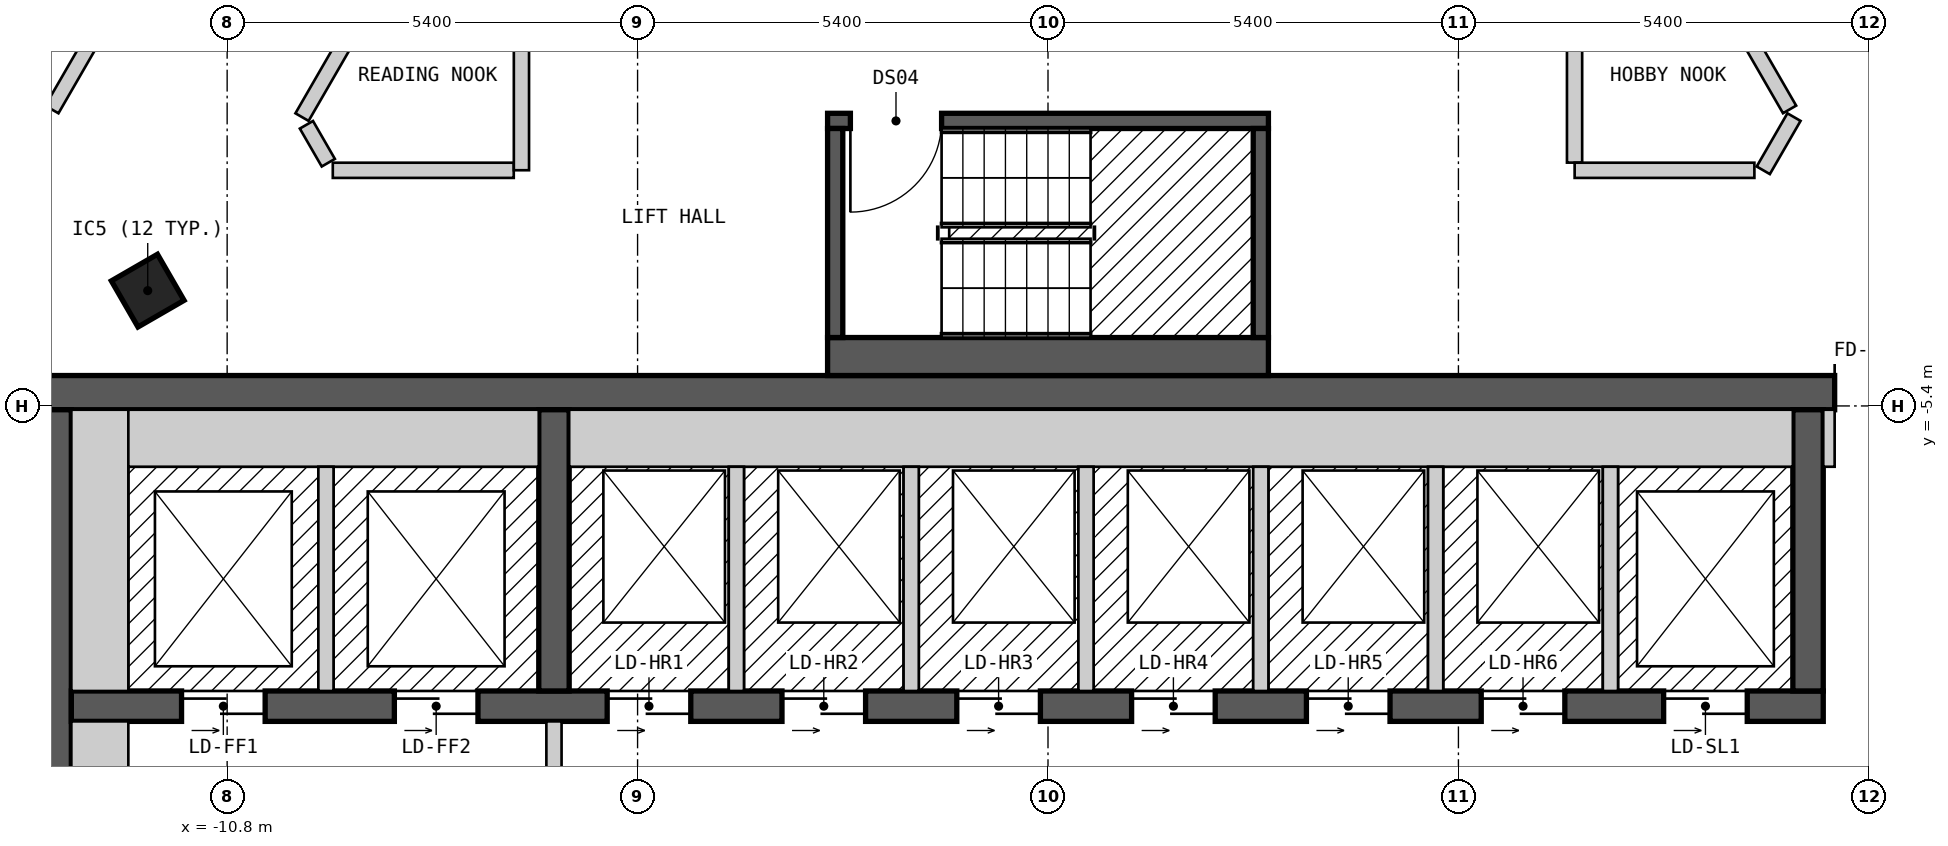
"""IFC4 building model, lengths in metres.
Left out: names, types, materials, properties, quantities, classifications, styles, units other than length and angle.
Written with IfcOpenShell. Run it as: python <this file> out.ifc"""

import sys

from ifc_helpers import new_model, si_unit, direction, frame, frame_2d, origin, origin_2d, place, context, subcontext, project, spatial, rectangle, extrude, element, fill, save


model = new_model("IFC4")
c1 = context("Model", 3, precision=1e-05, world=origin(), true_north=direction((0.0, 1.0)))
c2 = subcontext(c1, "Body", "Model", "MODEL_VIEW")
j1 = project(units=[si_unit("LENGTHUNIT", "METRE"), si_unit("PLANEANGLEUNIT", "RADIAN")], contexts=[c1])
p1 = place(None, origin())
s1 = spatial("IfcSite", under=j1, at=p1, CompositionType="ELEMENT")
p2 = place(p1, origin())
s2 = spatial("IfcBuilding", under=s1, at=p2, CompositionType="ELEMENT")
p3 = place(p2, frame((0.0, 0.0, 223.8)))
s3 = spatial("IfcBuildingStorey", under=s2, at=p3, CompositionType="ELEMENT", Elevation=223.8)
p4 = place(p3, frame((-11.845, -3.883, 0.0), z_axis=(0.0, 0.0, 1.0), x_axis=(0.499984884929, -0.866034130299, 0.0)))
e1 = element("IfcColumn", 1, at=p4, inside=s3, PredefinedType="COLUMN", context=c2, shape_type="SweptSolid", body=[
    extrude(rectangle(XDim=0.7, YDim=0.7, at=origin_2d()), origin(), (0.0, 0.0, 1.0), 3.0),
])
p5 = place(p3, frame((-13.3, -5.225, 0.0), z_axis=(0.0, 0.0, 1.0), x_axis=(1.0, 0.0, 0.0)))
e2 = element("IfcWall", 2, at=p5, inside=s3, PredefinedType="SHEAR", context=c2, shape_type="SweptSolid", body=[
    extrude(rectangle(XDim=26.6, YDim=0.45, at=frame_2d((13.3, 0.0))), origin(), (0.0, 0.0, 1.0), 2.7),
])
p6 = place(p5, frame((23.65, 0.0, 0.0)))
e3 = element("IfcOpeningElement", 3, at=p6, cuts=e2, PredefinedType="OPENING", context=c2, shape_type="SweptSolid", body=[
    extrude(rectangle(XDim=1.2, YDim=2.1, at=frame_2d((0.6, 1.05))), frame((0.0, 0.235, 0.0), z_axis=(0.0, -1.0, 0.0), x_axis=(1.0, 0.0, 0.0)), (0.0, 0.0, 1.0), 0.47),
])
p7 = place(p3, frame((-13.075, -18.55, 0.0), z_axis=(0.0, 0.0, 1.0), x_axis=(0.0, 1.0, 0.0)))
e4 = element("IfcWall", 4, at=p7, inside=s3, PredefinedType="SHEAR", context=c2, shape_type="SweptSolid", body=[
    extrude(rectangle(XDim=13.1, YDim=0.45, at=frame_2d((6.55, 0.0))), origin(), (0.0, 0.0, 1.0), 2.7),
])
p8 = place(p7, frame((4.35, 0.0, 0.0)))
e5 = element("IfcOpeningElement", 5, at=p8, cuts=e4, PredefinedType="OPENING", context=c2, shape_type="SweptSolid", body=[
    extrude(rectangle(XDim=1.2, YDim=2.1, at=frame_2d((0.6, 1.05))), frame((0.0, 0.235, 0.0), z_axis=(0.0, -1.0, 0.0), x_axis=(1.0, 0.0, 0.0)), (0.0, 0.0, 1.0), 0.47),
])
p9 = place(p3, frame((-12.85, -9.35, 0.0), z_axis=(0.0, 0.0, 1.0), x_axis=(1.0, 0.0, 0.0)))
e6 = element("IfcWall", 6, at=p9, inside=s3, PredefinedType="SHEAR", context=c2, shape_type="SweptSolid", body=[
    extrude(rectangle(XDim=23.05, YDim=0.4, at=frame_2d((11.525, 0.0))), origin(), (0.0, 0.0, 1.0), 2.7),
])
p10 = place(p9, frame((1.45, 0.0, 0.0)))
e7 = element("IfcOpeningElement", 7, at=p10, cuts=e6, PredefinedType="OPENING", context=c2, shape_type="SweptSolid", body=[
    extrude(rectangle(XDim=1.1, YDim=2.1, at=frame_2d((0.55, 1.05))), frame((0.0, 0.21, 0.0), z_axis=(0.0, -1.0, 0.0), x_axis=(1.0, 0.0, 0.0)), (0.0, 0.0, 1.0), 0.42),
])
p11 = place(p9, frame((4.25, 0.0, 0.0)))
e8 = element("IfcOpeningElement", 8, at=p11, cuts=e6, PredefinedType="OPENING", context=c2, shape_type="SweptSolid", body=[
    extrude(rectangle(XDim=1.1, YDim=2.1, at=frame_2d((0.55, 1.05))), frame((0.0, 0.21, 0.0), z_axis=(0.0, -1.0, 0.0), x_axis=(1.0, 0.0, 0.0)), (0.0, 0.0, 1.0), 0.42),
])
p12 = place(p9, frame((7.05, 0.0, 0.0)))
e9 = element("IfcOpeningElement", 9, at=p12, cuts=e6, PredefinedType="OPENING", context=c2, shape_type="SweptSolid", body=[
    extrude(rectangle(XDim=1.1, YDim=2.1, at=frame_2d((0.55, 1.05))), frame((0.0, 0.21, 0.0), z_axis=(0.0, -1.0, 0.0), x_axis=(1.0, 0.0, 0.0)), (0.0, 0.0, 1.0), 0.42),
])
p13 = place(p9, frame((9.35, 0.0, 0.0)))
e10 = element("IfcOpeningElement", 10, at=p13, cuts=e6, PredefinedType="OPENING", context=c2, shape_type="SweptSolid", body=[
    extrude(rectangle(XDim=1.1, YDim=2.1, at=frame_2d((0.55, 1.05))), frame((0.0, 0.21, 0.0), z_axis=(0.0, -1.0, 0.0), x_axis=(1.0, 0.0, 0.0)), (0.0, 0.0, 1.0), 0.42),
])
p14 = place(p9, frame((11.65, 0.0, 0.0)))
e11 = element("IfcOpeningElement", 11, at=p14, cuts=e6, PredefinedType="OPENING", context=c2, shape_type="SweptSolid", body=[
    extrude(rectangle(XDim=1.1, YDim=2.1, at=frame_2d((0.55, 1.05))), frame((0.0, 0.21, 0.0), z_axis=(0.0, -1.0, 0.0), x_axis=(1.0, 0.0, 0.0)), (0.0, 0.0, 1.0), 0.42),
])
p15 = place(p9, frame((13.95, 0.0, 0.0)))
e12 = element("IfcOpeningElement", 12, at=p15, cuts=e6, PredefinedType="OPENING", context=c2, shape_type="SweptSolid", body=[
    extrude(rectangle(XDim=1.1, YDim=2.1, at=frame_2d((0.55, 1.05))), frame((0.0, 0.21, 0.0), z_axis=(0.0, -1.0, 0.0), x_axis=(1.0, 0.0, 0.0)), (0.0, 0.0, 1.0), 0.42),
])
p16 = place(p9, frame((16.25, 0.0, 0.0)))
e13 = element("IfcOpeningElement", 13, at=p16, cuts=e6, PredefinedType="OPENING", context=c2, shape_type="SweptSolid", body=[
    extrude(rectangle(XDim=1.1, YDim=2.1, at=frame_2d((0.55, 1.05))), frame((0.0, 0.21, 0.0), z_axis=(0.0, -1.0, 0.0), x_axis=(1.0, 0.0, 0.0)), (0.0, 0.0, 1.0), 0.42),
])
p17 = place(p9, frame((18.55, 0.0, 0.0)))
e14 = element("IfcOpeningElement", 14, at=p17, cuts=e6, PredefinedType="OPENING", context=c2, shape_type="SweptSolid", body=[
    extrude(rectangle(XDim=1.1, YDim=2.1, at=frame_2d((0.55, 1.05))), frame((0.0, 0.21, 0.0), z_axis=(0.0, -1.0, 0.0), x_axis=(1.0, 0.0, 0.0)), (0.0, 0.0, 1.0), 0.42),
])
p18 = place(p9, frame((20.95, 0.0, 0.0)))
e15 = element("IfcOpeningElement", 15, at=p18, cuts=e6, PredefinedType="OPENING", context=c2, shape_type="SweptSolid", body=[
    extrude(rectangle(XDim=1.1, YDim=2.1, at=frame_2d((0.55, 1.05))), frame((0.0, 0.21, 0.0), z_axis=(0.0, -1.0, 0.0), x_axis=(1.0, 0.0, 0.0)), (0.0, 0.0, 1.0), 0.42),
])
for number, where, z_axis, x_axis in (
    (16, (-6.5, -9.15, 0.0), (0.0, 0.0, 1.0), (0.0, 1.0, 0.0)),
    (17, (10.0, -9.15, 0.0), (0.0, 0.0, 1.0), (0.0, 1.0, 0.0)),
):
    element("IfcWall", number, at=place(p3, frame(where, z_axis=z_axis, x_axis=x_axis)), inside=s3, PredefinedType="SHEAR", context=c2, shape_type="SweptSolid", body=[
        extrude(rectangle(XDim=3.7, YDim=0.4, at=frame_2d((1.85, 0.0))), origin(), (0.0, 0.0, 1.0), 2.7),
    ])
p19 = place(p3, frame((-2.9, -4.75, 0.0), z_axis=(0.0, 0.0, 1.0), x_axis=(1.0, 0.0, 0.0)))
e18 = element("IfcWall", 18, at=p19, inside=s3, PredefinedType="SOLIDWALL", context=c2, shape_type="SweptSolid", body=[
    extrude(rectangle(XDim=5.8, YDim=0.5, at=frame_2d((2.9, 0.0))), origin(), (0.0, 0.0, 1.0), 2.7),
])
p20 = place(p3, frame((-2.9, -1.65, 0.0), z_axis=(0.0, 0.0, 1.0), x_axis=(1.0, 0.0, 0.0)))
e19 = element("IfcWall", 19, at=p20, inside=s3, PredefinedType="SOLIDWALL", context=c2, shape_type="SweptSolid", body=[
    extrude(rectangle(XDim=5.8, YDim=0.2, at=frame_2d((2.9, 0.0))), origin(), (0.0, 0.0, 1.0), 2.7),
])
p21 = place(p20, frame((0.3, 0.0, 0.0)))
e20 = element("IfcOpeningElement", 20, at=p21, cuts=e19, PredefinedType="OPENING", context=c2, shape_type="SweptSolid", body=[
    extrude(rectangle(XDim=1.2, YDim=2.1, at=frame_2d((0.6, 1.05))), frame((0.0, 0.11, 0.0), z_axis=(0.0, -1.0, 0.0), x_axis=(1.0, 0.0, 0.0)), (0.0, 0.0, 1.0), 0.22),
])
for number, where, z_axis, x_axis in (
    (21, (-2.8, -4.5, 0.0), (0.0, 0.0, 1.0), (0.0, 1.0, 0.0)),
    (22, (2.8, -4.5, 0.0), (0.0, 0.0, 1.0), (0.0, 1.0, 0.0)),
):
    element("IfcWall", number, at=place(p3, frame(where, z_axis=z_axis, x_axis=x_axis)), inside=s3, PredefinedType="SOLIDWALL", context=c2, shape_type="SweptSolid", body=[
        extrude(rectangle(XDim=2.75, YDim=0.2, at=frame_2d((1.375, 0.0))), origin(), (0.0, 0.0, 1.0), 2.7),
    ])
p22 = place(p3, frame((-9.757, -1.701, 0.0), z_axis=(0.0, 0.0, 1.0), x_axis=(0.49996696679, -0.866044474677, 0.0)))
e23 = element("IfcWall", 23, at=p22, inside=s3, PredefinedType="PARTITIONING", context=c2, shape_type="SweptSolid", body=[
    extrude(rectangle(XDim=0.576, YDim=0.2, at=frame_2d((0.288, 0.0))), origin(), (0.0, 0.0, 1.0), 2.7),
])
p23 = place(p3, frame((7.622, 2.199, 0.0), z_axis=(0.0, 0.0, 1.0), x_axis=(0.499994660107, -0.866028486751, 0.0)))
e24 = element("IfcWall", 24, at=p23, inside=s3, PredefinedType="PARTITIONING", context=c2, shape_type="SweptSolid", body=[
    extrude(rectangle(XDim=4.27, YDim=0.2, at=frame_2d((2.135, 0.0))), origin(), (0.0, 0.0, 1.0), 2.7),
])
p24 = place(p23, frame((1.685, 0.0, 0.0)))
e25 = element("IfcOpeningElement", 25, at=p24, cuts=e24, PredefinedType="OPENING", context=c2, shape_type="SweptSolid", body=[
    extrude(rectangle(XDim=0.9, YDim=2.1, at=frame_2d((0.45, 1.05))), frame((0.0, 0.11, 0.0), z_axis=(0.0, -1.0, 0.0), x_axis=(1.0, 0.0, 0.0)), (0.0, 0.0, 1.0), 0.22),
])
p25 = place(p3, frame((9.238, 5.2, 0.0), z_axis=(0.0, 0.0, 1.0), x_axis=(0.500025705601, -0.86601056214, 0.0)))
e26 = element("IfcWall", 26, at=p25, inside=s3, PredefinedType="PARTITIONING", context=c2, shape_type="SweptSolid", body=[
    extrude(rectangle(XDim=7.735, YDim=0.2, at=frame_2d((3.868, 0.0))), origin(), (0.0, 0.0, 1.0), 2.7),
])
p26 = place(p25, frame((6.898, 0.0, 0.0)))
e27 = element("IfcOpeningElement", 27, at=p26, cuts=e26, PredefinedType="OPENING", context=c2, shape_type="SweptSolid", body=[
    extrude(rectangle(XDim=0.8, YDim=2.1, at=frame_2d((0.4, 1.05))), frame((0.0, 0.11, 0.0), z_axis=(0.0, -1.0, 0.0), x_axis=(1.0, 0.0, 0.0)), (0.0, 0.0, 1.0), 0.22),
])
p27 = place(p25, frame((1.988, 0.0, 0.0)))
e28 = element("IfcOpeningElement", 28, at=p27, cuts=e26, PredefinedType="OPENING", context=c2, shape_type="SweptSolid", body=[
    extrude(rectangle(XDim=1.0, YDim=2.1, at=frame_2d((0.5, 1.05))), frame((0.0, 0.11, 0.0), z_axis=(0.0, -1.0, 0.0), x_axis=(1.0, 0.0, 0.0)), (0.0, 0.0, 1.0), 0.22),
])
p28 = place(p3, frame((6.928, 1.0, 0.0), z_axis=(0.0, 0.0, 1.0), x_axis=(0.0, -1.0, 0.0)))
e29 = element("IfcWall", 29, at=p28, inside=s3, PredefinedType="PARTITIONING", context=c2, shape_type="SweptSolid", body=[
    extrude(rectangle(XDim=3.199, YDim=0.2, at=frame_2d((1.6, 0.0))), origin(), (0.0, 0.0, 1.0), 2.7),
])
p29 = place(p3, frame((-9.41, -2.3, 0.0), z_axis=(0.0, 0.0, 1.0), x_axis=(1.0, 0.0, 0.0)))
e30 = element("IfcWall", 30, at=p29, inside=s3, PredefinedType="PARTITIONING", context=c2, shape_type="SweptSolid", body=[
    extrude(rectangle(XDim=2.381, YDim=0.2, at=frame_2d((1.19, 0.0))), origin(), (0.0, 0.0, 1.0), 2.7),
])
p30 = place(p3, frame((6.929, -2.3, 0.0), z_axis=(0.0, 0.0, 1.0), x_axis=(1.0, 0.0, 0.0)))
e31 = element("IfcWall", 31, at=p30, inside=s3, PredefinedType="PARTITIONING", context=c2, shape_type="SweptSolid", body=[
    extrude(rectangle(XDim=2.365, YDim=0.2, at=frame_2d((1.183, 0.0))), origin(), (0.0, 0.0, 1.0), 2.7),
])
p31 = place(p3, frame((9.411, -2.3, 0.0), z_axis=(0.0, 0.0, 1.0), x_axis=(0.499940363534, 0.866059832176, 0.0)))
e32 = element("IfcWall", 32, at=p31, inside=s3, PredefinedType="PARTITIONING", context=c2, shape_type="SweptSolid", body=[
    extrude(rectangle(XDim=0.808, YDim=0.2, at=frame_2d((0.404, 0.0))), origin(), (0.0, 0.0, 1.0), 2.7),
])
p32 = place(p3, frame((-9.815, -1.6, 0.0), z_axis=(0.0, 0.0, 1.0), x_axis=(0.500058909736, 0.865991389561, 0.0)))
e33 = element("IfcWall", 33, at=p32, inside=s3, PredefinedType="PARTITIONING", context=c2, shape_type="SweptSolid", body=[
    extrude(rectangle(XDim=4.501, YDim=0.2, at=frame_2d((2.251, 0.0))), origin(), (0.0, 0.0, 1.0), 2.7),
])
p33 = place(p32, frame((1.801, 0.0, 0.0)))
e34 = element("IfcOpeningElement", 34, at=p33, cuts=e33, PredefinedType="OPENING", context=c2, shape_type="SweptSolid", body=[
    extrude(rectangle(XDim=0.9, YDim=2.1, at=frame_2d((0.45, 1.05))), frame((0.0, 0.11, 0.0), z_axis=(0.0, -1.0, 0.0), x_axis=(1.0, 0.0, 0.0)), (0.0, 0.0, 1.0), 0.22),
])
p34 = place(p3, frame((-13.106, -1.5, 0.0), z_axis=(0.0, 0.0, 1.0), x_axis=(0.500025705601, 0.86601056214, 0.0)))
e35 = element("IfcWall", 35, at=p34, inside=s3, PredefinedType="PARTITIONING", context=c2, shape_type="SweptSolid", body=[
    extrude(rectangle(XDim=7.735, YDim=0.2, at=frame_2d((3.868, 0.0))), origin(), (0.0, 0.0, 1.0), 2.7),
])
p35 = place(p3, frame((-6.928, -2.299, 0.0), z_axis=(0.0, 0.0, 1.0), x_axis=(0.0, 1.0, 0.0)))
e36 = element("IfcWall", 36, at=p35, inside=s3, PredefinedType="PARTITIONING", context=c2, shape_type="SweptSolid", body=[
    extrude(rectangle(XDim=3.499, YDim=0.2, at=frame_2d((1.75, 0.0))), origin(), (0.0, 0.0, 1.0), 2.7),
])
p36 = place(p3, frame((-12.475, -13.0, 0.0), z_axis=(0.0, 0.0, 1.0), x_axis=(0.0, 1.0, 0.0)))
e37 = element("IfcWall", 37, at=p36, inside=s3, PredefinedType="PARTITIONING", context=c2, shape_type="SweptSolid", body=[
    extrude(rectangle(XDim=3.45, YDim=0.75, at=frame_2d((1.725, 0.0))), origin(), (0.0, 0.0, 1.0), 2.7),
])
p37 = place(p3, frame((-12.475, -9.15, 0.0), z_axis=(0.0, 0.0, 1.0), x_axis=(0.0, 1.0, 0.0)))
e38 = element("IfcWall", 38, at=p37, inside=s3, PredefinedType="SOLIDWALL", context=c2, shape_type="SweptSolid", body=[
    extrude(rectangle(XDim=3.7, YDim=0.75, at=frame_2d((1.85, 0.0))), origin(), (0.0, 0.0, 1.0), 2.7),
])
p38 = place(p3, frame((-12.1, -5.825, 0.0), z_axis=(0.0, 0.0, 1.0), x_axis=(1.0, 0.0, 0.0)))
e39 = element("IfcWall", 39, at=p38, inside=s3, PredefinedType="SOLIDWALL", context=c2, shape_type="SweptSolid", body=[
    extrude(rectangle(XDim=5.4, YDim=0.75, at=frame_2d((2.7, 0.0))), origin(), (0.0, 0.0, 1.0), 2.7),
])
p39 = place(p3, frame((-9.5, -9.15, 0.0), z_axis=(0.0, 0.0, 1.0), x_axis=(0.0, 1.0, 0.0)))
e40 = element("IfcWall", 40, at=p39, inside=s3, PredefinedType="SOLIDWALL", context=c2, shape_type="SweptSolid", body=[
    extrude(rectangle(XDim=2.95, YDim=0.2, at=frame_2d((1.475, 0.0))), origin(), (0.0, 0.0, 1.0), 2.7),
])
p40 = place(p3, frame((-6.5, -14.45, 0.0), z_axis=(0.0, 0.0, 1.0), x_axis=(0.0, 1.0, 0.0)))
e41 = element("IfcWall", 41, at=p40, inside=s3, PredefinedType="PARTITIONING", context=c2, shape_type="SweptSolid", body=[
    extrude(rectangle(XDim=4.9, YDim=0.2, at=frame_2d((2.45, 0.0))), origin(), (0.0, 0.0, 1.0), 2.7),
])
p41 = place(p40, frame((3.15, 0.0, 0.0), z_axis=(0.0, 0.0, 1.0), x_axis=(-1.0, 0.0, 0.0)))
e42 = element("IfcOpeningElement", 42, at=p41, cuts=e41, PredefinedType="OPENING", context=c2, shape_type="SweptSolid", body=[
    extrude(rectangle(XDim=1.4, YDim=2.1, at=frame_2d((0.7, 1.05))), frame((0.0, 0.11, 0.0), z_axis=(0.0, -1.0, 0.0), x_axis=(1.0, 0.0, 0.0)), (0.0, 0.0, 1.0), 0.22),
])
p42 = place(p3, frame((-6.3, -5.825, 0.0), z_axis=(0.0, 0.0, 1.0), x_axis=(1.0, 0.0, 0.0)))
e43 = element("IfcWall", 43, at=p42, inside=s3, PredefinedType="SOLIDWALL", context=c2, shape_type="SweptSolid", body=[
    extrude(rectangle(XDim=16.1, YDim=0.75, at=frame_2d((8.05, 0.0))), origin(), (0.0, 0.0, 1.0), 2.7),
])
for number, where, z_axis, x_axis in (
    (44, (-4.1, -9.15, 0.0), (0.0, 0.0, 1.0), (0.0, 1.0, 0.0)),
    (45, (-1.8, -9.15, 0.0), (0.0, 0.0, 1.0), (0.0, 1.0, 0.0)),
    (46, (0.5, -9.15, 0.0), (0.0, 0.0, 1.0), (0.0, 1.0, 0.0)),
    (47, (2.8, -9.15, 0.0), (0.0, 0.0, 1.0), (0.0, 1.0, 0.0)),
    (48, (5.1, -9.15, 0.0), (0.0, 0.0, 1.0), (0.0, 1.0, 0.0)),
    (49, (7.4, -9.15, 0.0), (0.0, 0.0, 1.0), (0.0, 1.0, 0.0)),
):
    element("IfcWall", number, at=place(p3, frame(where, z_axis=z_axis, x_axis=x_axis)), inside=s3, PredefinedType="SOLIDWALL", context=c2, shape_type="SweptSolid", body=[
        extrude(rectangle(XDim=2.95, YDim=0.2, at=frame_2d((1.475, 0.0))), origin(), (0.0, 0.0, 1.0), 2.7),
    ])
p43 = place(p3, frame((10.275, -6.2, 0.0), z_axis=(0.0, 0.0, 1.0), x_axis=(0.0, 1.0, 0.0)))
e50 = element("IfcWall", 50, at=p43, inside=s3, PredefinedType="PARTITIONING", context=c2, shape_type="SweptSolid", body=[
    extrude(rectangle(XDim=0.75, YDim=0.15, at=frame_2d((0.375, 0.0))), origin(), (0.0, 0.0, 1.0), 2.7),
])
p44 = place(p21, origin())
e51 = element("IfcDoor", 51, at=p44, inside=s3, OperationType="SINGLE_SWING_LEFT", PredefinedType="DOOR", context=c2, shape_type="SweptSolid", body=[
    extrude(rectangle(XDim=1.2, YDim=2.1, at=frame_2d((0.6, 1.05))), frame((0.0, 0.025, 0.0), z_axis=(0.0, -1.0, 0.0), x_axis=(1.0, 0.0, 0.0)), (0.0, 0.0, 1.0), 0.05),
])
fill(e20, e51)
p45 = place(p10, origin())
e52 = element("IfcDoor", 52, at=p45, inside=s3, OperationType="DOUBLE_DOOR_SLIDING", PredefinedType="DOOR", context=c2, shape_type="SweptSolid", body=[
    extrude(rectangle(XDim=1.1, YDim=2.1, at=frame_2d((0.55, 1.05))), frame((0.0, 0.025, 0.0), z_axis=(0.0, -1.0, 0.0), x_axis=(1.0, 0.0, 0.0)), (0.0, 0.0, 1.0), 0.05),
])
fill(e7, e52)
p46 = place(p11, origin())
e53 = element("IfcDoor", 53, at=p46, inside=s3, OperationType="DOUBLE_DOOR_SLIDING", PredefinedType="DOOR", context=c2, shape_type="SweptSolid", body=[
    extrude(rectangle(XDim=1.1, YDim=2.1, at=frame_2d((0.55, 1.05))), frame((0.0, 0.025, 0.0), z_axis=(0.0, -1.0, 0.0), x_axis=(1.0, 0.0, 0.0)), (0.0, 0.0, 1.0), 0.05),
])
fill(e8, e53)
p47 = place(p12, origin())
e54 = element("IfcDoor", 54, at=p47, inside=s3, OperationType="DOUBLE_DOOR_SLIDING", PredefinedType="DOOR", context=c2, shape_type="SweptSolid", body=[
    extrude(rectangle(XDim=1.1, YDim=2.1, at=frame_2d((0.55, 1.05))), frame((0.0, 0.025, 0.0), z_axis=(0.0, -1.0, 0.0), x_axis=(1.0, 0.0, 0.0)), (0.0, 0.0, 1.0), 0.05),
])
fill(e9, e54)
p48 = place(p13, origin())
e55 = element("IfcDoor", 55, at=p48, inside=s3, OperationType="DOUBLE_DOOR_SLIDING", PredefinedType="DOOR", context=c2, shape_type="SweptSolid", body=[
    extrude(rectangle(XDim=1.1, YDim=2.1, at=frame_2d((0.55, 1.05))), frame((0.0, 0.025, 0.0), z_axis=(0.0, -1.0, 0.0), x_axis=(1.0, 0.0, 0.0)), (0.0, 0.0, 1.0), 0.05),
])
fill(e10, e55)
p49 = place(p14, origin())
e56 = element("IfcDoor", 56, at=p49, inside=s3, OperationType="DOUBLE_DOOR_SLIDING", PredefinedType="DOOR", context=c2, shape_type="SweptSolid", body=[
    extrude(rectangle(XDim=1.1, YDim=2.1, at=frame_2d((0.55, 1.05))), frame((0.0, 0.025, 0.0), z_axis=(0.0, -1.0, 0.0), x_axis=(1.0, 0.0, 0.0)), (0.0, 0.0, 1.0), 0.05),
])
fill(e11, e56)
p50 = place(p15, origin())
e57 = element("IfcDoor", 57, at=p50, inside=s3, OperationType="DOUBLE_DOOR_SLIDING", PredefinedType="DOOR", context=c2, shape_type="SweptSolid", body=[
    extrude(rectangle(XDim=1.1, YDim=2.1, at=frame_2d((0.55, 1.05))), frame((0.0, 0.025, 0.0), z_axis=(0.0, -1.0, 0.0), x_axis=(1.0, 0.0, 0.0)), (0.0, 0.0, 1.0), 0.05),
])
fill(e12, e57)
p51 = place(p16, origin())
e58 = element("IfcDoor", 58, at=p51, inside=s3, OperationType="DOUBLE_DOOR_SLIDING", PredefinedType="DOOR", context=c2, shape_type="SweptSolid", body=[
    extrude(rectangle(XDim=1.1, YDim=2.1, at=frame_2d((0.55, 1.05))), frame((0.0, 0.025, 0.0), z_axis=(0.0, -1.0, 0.0), x_axis=(1.0, 0.0, 0.0)), (0.0, 0.0, 1.0), 0.05),
])
fill(e13, e58)
p52 = place(p17, origin())
e59 = element("IfcDoor", 59, at=p52, inside=s3, OperationType="DOUBLE_DOOR_SLIDING", PredefinedType="DOOR", context=c2, shape_type="SweptSolid", body=[
    extrude(rectangle(XDim=1.1, YDim=2.1, at=frame_2d((0.55, 1.05))), frame((0.0, 0.025, 0.0), z_axis=(0.0, -1.0, 0.0), x_axis=(1.0, 0.0, 0.0)), (0.0, 0.0, 1.0), 0.05),
])
fill(e14, e59)
p53 = place(p18, origin())
e60 = element("IfcDoor", 60, at=p53, inside=s3, OperationType="DOUBLE_DOOR_SLIDING", PredefinedType="DOOR", context=c2, shape_type="SweptSolid", body=[
    extrude(rectangle(XDim=1.1, YDim=2.1, at=frame_2d((0.55, 1.05))), frame((0.0, 0.025, 0.0), z_axis=(0.0, -1.0, 0.0), x_axis=(1.0, 0.0, 0.0)), (0.0, 0.0, 1.0), 0.05),
])
fill(e15, e60)
p54 = place(p6, origin())
e61 = element("IfcDoor", 61, at=p54, inside=s3, OperationType="DOUBLE_DOOR_SINGLE_SWING", PredefinedType="DOOR", context=c2, shape_type="SweptSolid", body=[
    extrude(rectangle(XDim=1.2, YDim=2.1, at=frame_2d((0.6, 1.05))), frame((0.0, 0.025, 0.0), z_axis=(0.0, -1.0, 0.0), x_axis=(1.0, 0.0, 0.0)), (0.0, 0.0, 1.0), 0.05),
])
fill(e3, e61)
save(model, sys.argv[1])
